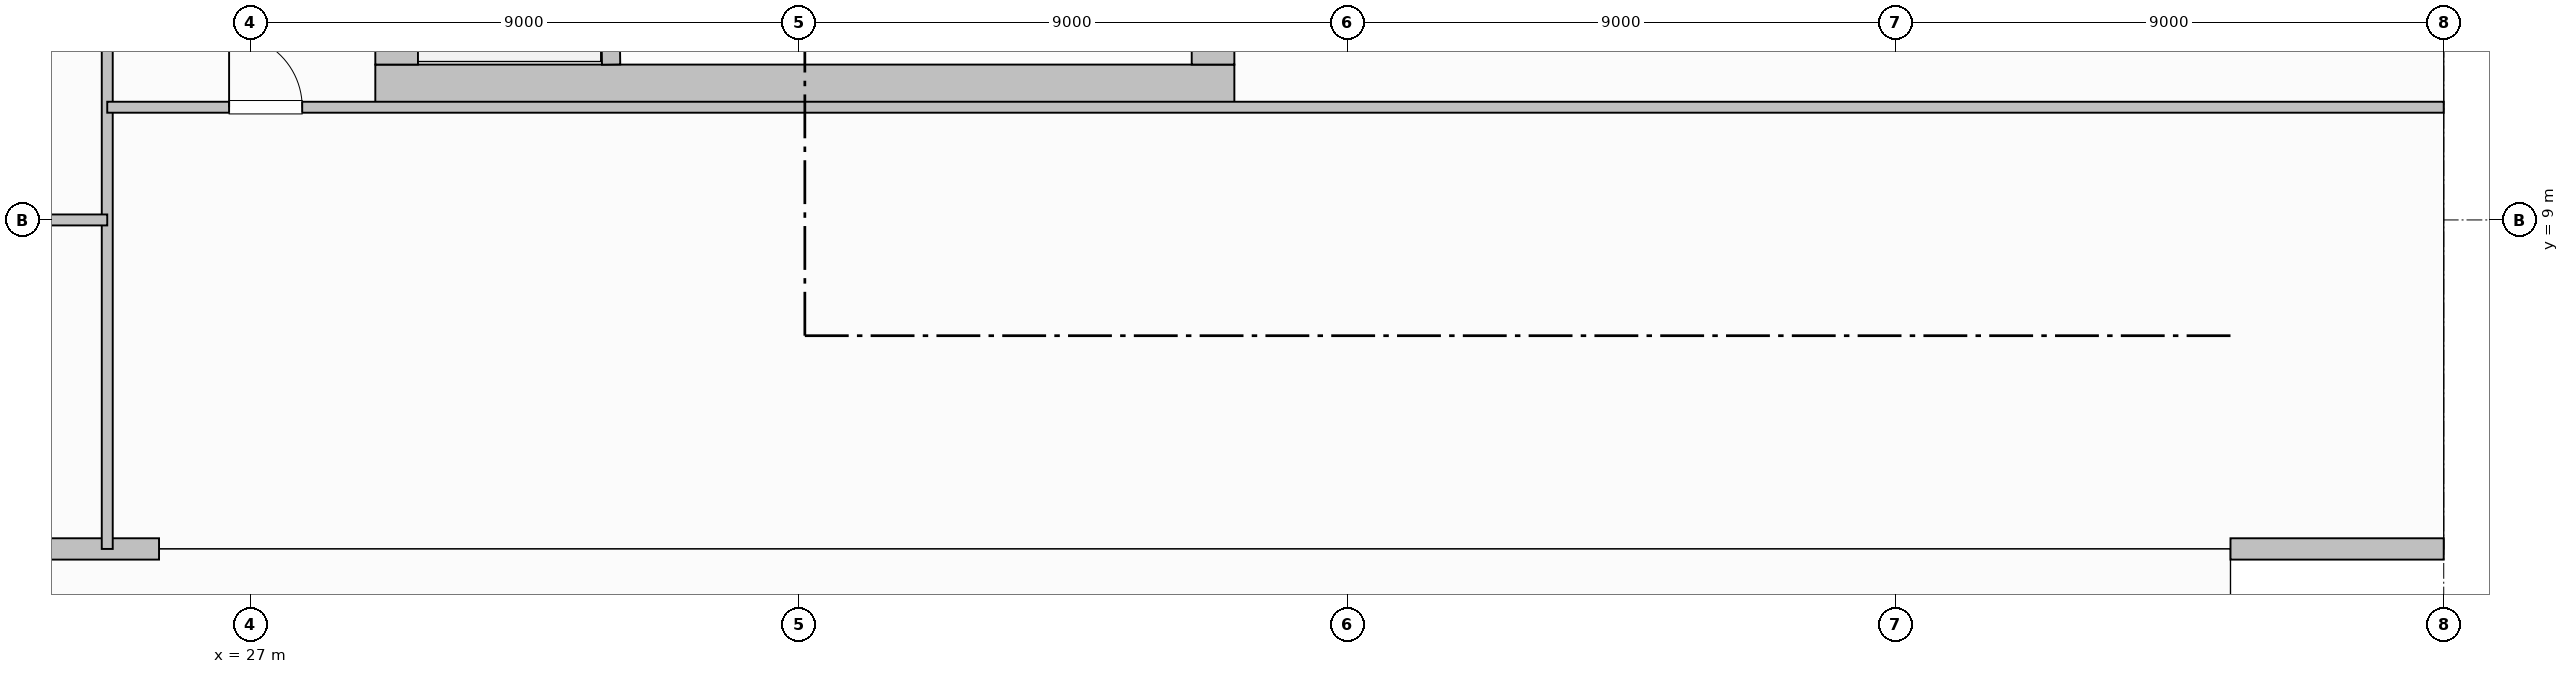
"""IFC4 building model, lengths in metres.
Left out: names, types, materials, properties, quantities, classifications, styles, units other than length and angle.
Written with IfcOpenShell. Run it as: python <this file> out.ifc"""

import sys

from ifc_helpers import new_model, si_unit, direction, frame, frame_2d, origin, origin_2d, place, context, subcontext, project, spatial, rectangle, i_section, extrude, element, fill, save


model = new_model("IFC4")
c1 = context("Model", 3, precision=1e-05, world=origin(), true_north=direction((0.0, 1.0)))
c2 = subcontext(c1, "Body", "Model", "MODEL_VIEW")
j1 = project(units=[si_unit("LENGTHUNIT", "METRE"), si_unit("PLANEANGLEUNIT", "RADIAN")], contexts=[c1])
p1 = place(None, origin())
s1 = spatial("IfcSite", under=j1, at=p1, CompositionType="ELEMENT")
p2 = place(p1, origin())
s2 = spatial("IfcBuilding", under=s1, at=p2, CompositionType="ELEMENT")
p3 = place(p2, frame((0.0, 0.0, 11.0)))
s3 = spatial("IfcBuildingStorey", under=s2, at=p3, CompositionType="ELEMENT", Elevation=11.0)
for number, where, z_axis, x_axis in (
    (1, (27.0, 9.0, 0.0), (0.0, 0.0, 1.0), (1.0, 0.0, 0.0)),
    (2, (36.0, 9.0, 0.0), (0.0, 0.0, 1.0), (1.0, 0.0, 0.0)),
    (3, (45.0, 9.0, 0.0), (0.0, 0.0, 1.0), (1.0, 0.0, 0.0)),
    (4, (54.0, 9.0, 0.0), (0.0, 0.0, 1.0), (1.0, 0.0, 0.0)),
    (5, (63.0, 9.0, 0.0), (0.0, 0.0, 1.0), (1.0, 0.0, 0.0)),
    (6, (27.0, 4.5, 0.0), (0.0, 0.0, 1.0), (1.0, 0.0, 0.0)),
    (7, (36.0, 4.5, 0.0), (0.0, 0.0, 1.0), (1.0, 0.0, 0.0)),
    (8, (45.0, 4.5, 0.0), (0.0, 0.0, 1.0), (1.0, 0.0, 0.0)),
    (9, (54.0, 4.5, 0.0), (0.0, 0.0, 1.0), (1.0, 0.0, 0.0)),
    (10, (63.0, 4.5, 0.0), (0.0, 0.0, 1.0), (1.0, 0.0, 0.0)),
):
    element("IfcColumn", number, at=place(p3, frame(where, z_axis=z_axis, x_axis=x_axis)), inside=s3, PredefinedType="COLUMN", context=c2, shape_type="SweptSolid", body=[
        extrude(i_section(OverallWidth=0.442, OverallDepth=0.531, WebThickness=0.066, FlangeThickness=0.106, FilletRadius=0.015, at=origin_2d()), origin(), (0.0, 0.0, 1.0), 5.2),
    ])
p4 = place(p3, frame((25.5, 3.6, 0.0), z_axis=(0.0, 0.0, 1.0), x_axis=(-1.0, 0.0, 0.0)))
e11 = element("IfcWall", 11, at=p4, inside=s3, PredefinedType="SOLIDWALL", context=c2, shape_type="SweptSolid", body=[
    extrude(rectangle(XDim=5.1, YDim=0.35, at=frame_2d((2.55, 0.0))), origin(), (0.0, 0.0, 1.0), 4.88),
])
p5 = place(p4, frame((2.35, 0.0, 0.0)))
e12 = element("IfcOpeningElement", 12, at=p5, cuts=e11, PredefinedType="OPENING", context=c2, shape_type="SweptSolid", body=[
    extrude(rectangle(XDim=1.3, YDim=2.2, at=frame_2d((0.65, 1.1))), frame((0.0, 0.185, 0.0), z_axis=(0.0, -1.0, 0.0), x_axis=(1.0, 0.0, 0.0)), (0.0, 0.0, 1.0), 0.37),
])
p6 = place(p3, frame((63.0, 3.6, 0.0), z_axis=(0.0, 0.0, 1.0), x_axis=(-1.0, 0.0, 0.0)))
e13 = element("IfcWall", 13, at=p6, inside=s3, PredefinedType="SOLIDWALL", context=c2, shape_type="SweptSolid", body=[
    extrude(rectangle(XDim=3.5, YDim=0.35, at=frame_2d((1.75, 0.0))), origin(), (0.0, 0.0, 1.0), 4.88),
])
p7 = place(p3, frame((29.05, 11.2, 0.0), z_axis=(0.0, 0.0, 1.0), x_axis=(1.0, 0.0, 0.0)))
e14 = element("IfcWall", 14, at=p7, inside=s3, PredefinedType="SHEAR", context=c2, shape_type="SweptSolid", body=[
    extrude(rectangle(XDim=14.1, YDim=0.7, at=frame_2d((7.05, 0.0))), origin(), (0.0, 0.0, 1.0), 4.88),
])
p8 = place(p3, frame((29.4, 24.25, 0.0), z_axis=(0.0, 0.0, 1.0), x_axis=(0.0, -1.0, 0.0)))
e15 = element("IfcWall", 15, at=p8, inside=s3, PredefinedType="SHEAR", context=c2, shape_type="SweptSolid", body=[
    extrude(rectangle(XDim=12.7, YDim=0.7, at=frame_2d((6.35, 0.0))), origin(), (0.0, 0.0, 1.0), 4.88),
])
p9 = place(p8, frame((1.35, 0.0, 0.0)))
e16 = element("IfcOpeningElement", 16, at=p9, cuts=e15, PredefinedType="OPENING", context=c2, shape_type="SweptSolid", body=[
    extrude(rectangle(XDim=1.35, YDim=2.15, at=frame_2d((0.675, 1.075))), frame((0.0, 0.36, 0.0), z_axis=(0.0, -1.0, 0.0), x_axis=(1.0, 0.0, 0.0)), (0.0, 0.0, 1.0), 0.72),
])
p10 = place(p3, frame((42.8, 11.55, 0.0), z_axis=(0.0, 0.0, 1.0), x_axis=(0.0, 1.0, 0.0)))
e17 = element("IfcWall", 17, at=p10, inside=s3, PredefinedType="SHEAR", context=c2, shape_type="SweptSolid", body=[
    extrude(rectangle(XDim=12.7, YDim=0.7, at=frame_2d((6.35, 0.0))), origin(), (0.0, 0.0, 1.0), 4.88),
])
p11 = place(p3, frame((32.92, 11.55, 0.0), z_axis=(0.0, 0.0, 1.0), x_axis=(-0.01331804616, 0.99991131089, 0.0)))
e18 = element("IfcWall", 18, at=p11, inside=s3, PredefinedType="SHEAR", context=c2, shape_type="SweptSolid", body=[
    extrude(rectangle(XDim=9.001, YDim=0.3, at=frame_2d((4.5, 0.0))), origin(), (0.0, 0.0, 1.0), 4.88),
])
p12 = place(p3, frame((24.65, 3.6, 0.0), z_axis=(0.0, 0.0, 1.0), x_axis=(0.0, 1.0, 0.0)))
e19 = element("IfcWall", 19, at=p12, inside=s3, PredefinedType="PARTITIONING", context=c2, shape_type="SweptSolid", body=[
    extrude(rectangle(XDim=24.6, YDim=0.18, at=frame_2d((12.3, 0.0))), origin(), (0.0, 0.0, 1.0), 3.912),
])
p13 = place(p12, frame((10.4, 0.0, 0.0)))
e20 = element("IfcOpeningElement", 20, at=p13, cuts=e19, PredefinedType="OPENING", context=c2, shape_type="SweptSolid", body=[
    extrude(rectangle(XDim=1.4, YDim=2.15, at=frame_2d((0.7, 1.075))), frame((0.0, 0.1, 0.0), z_axis=(0.0, -1.0, 0.0), x_axis=(1.0, 0.0, 0.0)), (0.0, 0.0, 1.0), 0.2),
])
p14 = place(p3, frame((24.65, 10.85, 0.0), z_axis=(0.0, 0.0, 1.0), x_axis=(1.0, 0.0, 0.0)))
e21 = element("IfcWall", 21, at=p14, inside=s3, PredefinedType="PARTITIONING", context=c2, shape_type="SweptSolid", body=[
    extrude(rectangle(XDim=38.35, YDim=0.18, at=frame_2d((19.175, 0.0))), origin(), (0.0, 0.0, 1.0), 4.005),
])
p15 = place(p14, frame((2.0, 0.0, 0.0)))
e22 = element("IfcOpeningElement", 22, at=p15, cuts=e21, PredefinedType="OPENING", context=c2, shape_type="SweptSolid", body=[
    extrude(rectangle(XDim=1.2, YDim=2.15, at=frame_2d((0.6, 1.075))), frame((0.0, 0.1, 0.0), z_axis=(0.0, -1.0, 0.0), x_axis=(1.0, 0.0, 0.0)), (0.0, 0.0, 1.0), 0.2),
])
p16 = place(p3, frame((3.6, 9.0, 0.0), z_axis=(0.0, 0.0, 1.0), x_axis=(1.0, 0.0, 0.0)))
e23 = element("IfcWall", 23, at=p16, inside=s3, PredefinedType="PARTITIONING", context=c2, shape_type="SweptSolid", body=[
    extrude(rectangle(XDim=21.05, YDim=0.18, at=frame_2d((10.525, 0.0))), origin(), (0.0, 0.0, 1.0), 3.933),
])
p17 = place(p16, frame((9.9, 0.0, 0.0)))
e24 = element("IfcOpeningElement", 24, at=p17, cuts=e23, PredefinedType="OPENING", context=c2, shape_type="SweptSolid", body=[
    extrude(rectangle(XDim=1.05, YDim=2.15, at=frame_2d((0.525, 1.075))), frame((0.0, 0.1, 0.0), z_axis=(0.0, -1.0, 0.0), x_axis=(1.0, 0.0, 0.0)), (0.0, 0.0, 1.0), 0.2),
])
p18 = place(p15, origin())
e25 = element("IfcDoor", 25, at=p18, inside=s3, OperationType="SINGLE_SWING_LEFT", PredefinedType="DOOR", context=c2, shape_type="SweptSolid", body=[
    extrude(rectangle(XDim=1.2, YDim=2.15, at=frame_2d((0.6, 1.075))), frame((0.0, 0.025, 0.0), z_axis=(0.0, -1.0, 0.0), x_axis=(1.0, 0.0, 0.0)), (0.0, 0.0, 1.0), 0.05),
])
fill(e22, e25)
save(model, sys.argv[1])
